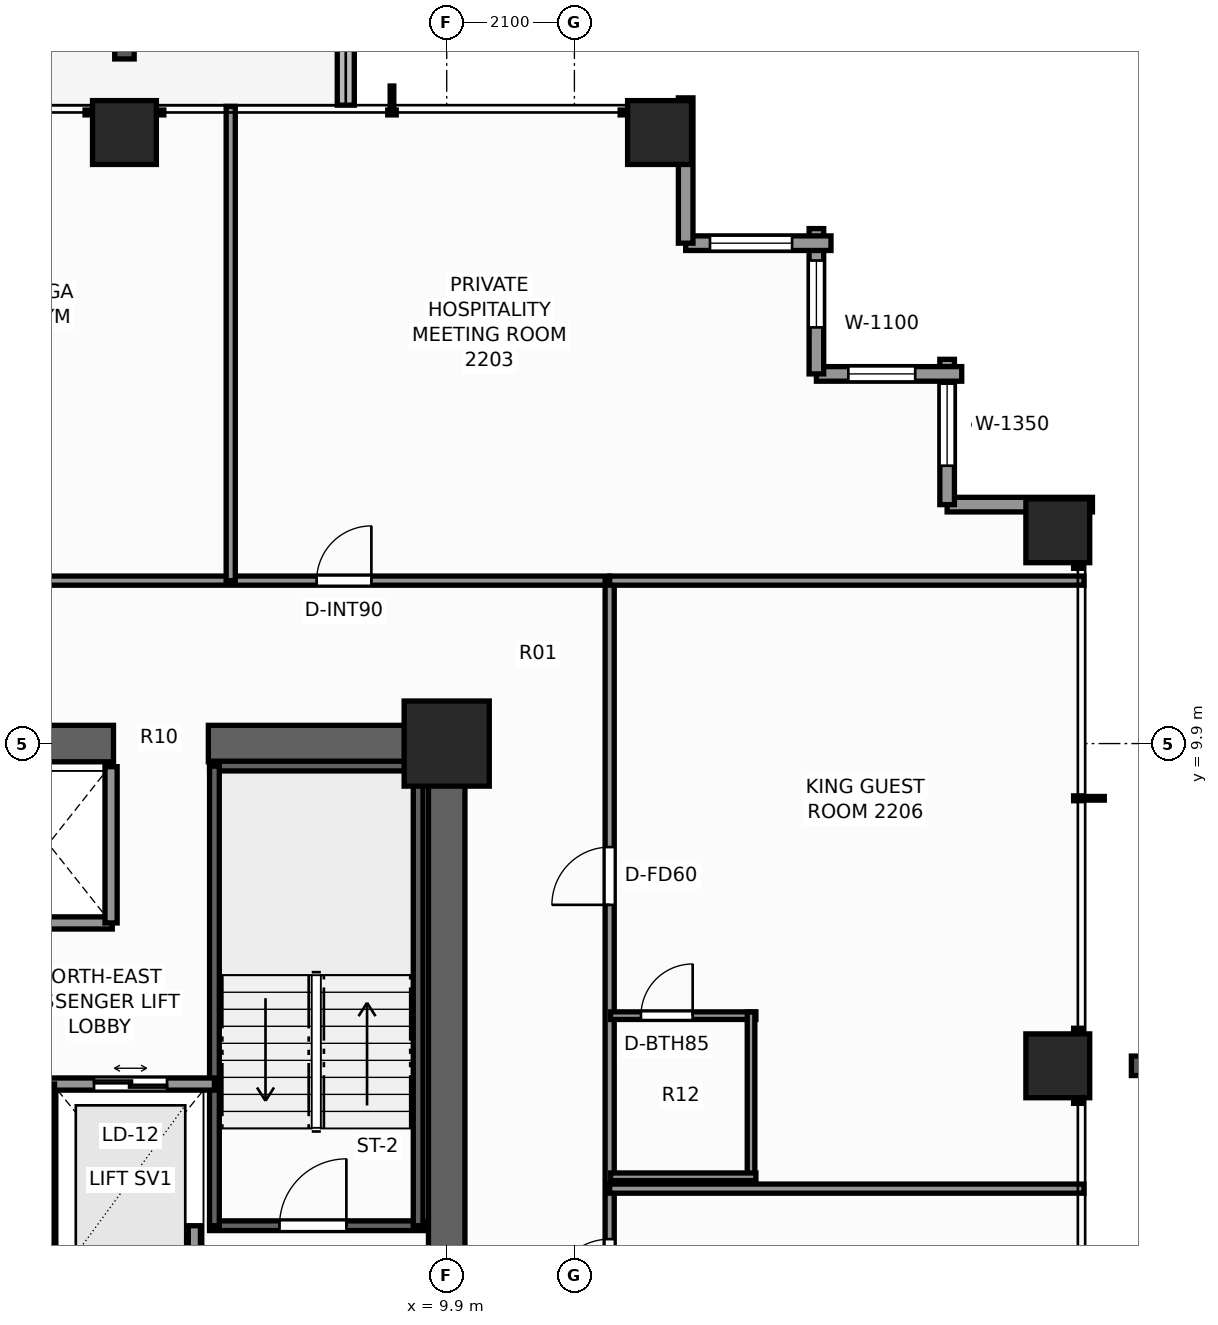
"""IFC4 building model, lengths in metres.
Left out: names, types, materials, properties, quantities, classifications, styles, units other than length and angle.
Written with IfcOpenShell. Run it as: python <this file> out.ifc"""

import sys

from ifc_helpers import new_model, si_unit, direction, frame, frame_2d, origin, origin_2d, place, context, subcontext, project, spatial, rectangle, extrude, element, fill, save


model = new_model("IFC4")
c1 = context("Model", 3, precision=1e-05, world=origin(), true_north=direction((0.0, 1.0)))
c2 = subcontext(c1, "Body", "Model", "MODEL_VIEW")
j1 = project(units=[si_unit("LENGTHUNIT", "METRE"), si_unit("PLANEANGLEUNIT", "RADIAN")], contexts=[c1])
p1 = place(None, origin())
s1 = spatial("IfcSite", under=j1, at=p1, CompositionType="ELEMENT")
p2 = place(p1, origin())
s2 = spatial("IfcBuilding", under=s1, at=p2, CompositionType="ELEMENT")
p3 = place(p2, frame((0.0, 0.0, 78.8)))
s3 = spatial("IfcBuildingStorey", under=s2, at=p3, CompositionType="ELEMENT", Elevation=78.8)
p4 = place(p3, frame((-10.2, 9.9, 0.0), z_axis=(0.0, 0.0, 1.0), x_axis=(1.0, 0.0, 0.0)))
e1 = element("IfcWall", 1, at=p4, inside=s3, PredefinedType="SHEAR", context=c2, shape_type="SweptSolid", body=[
    extrude(rectangle(XDim=14.62, YDim=0.6, at=frame_2d((7.31, 0.0))), origin(), (0.0, 0.0, 1.0), 3.3),
])
p5 = place(p3, frame((5.98, 9.9, 0.0), z_axis=(0.0, 0.0, 1.0), x_axis=(1.0, 0.0, 0.0)))
e2 = element("IfcWall", 2, at=p5, inside=s3, PredefinedType="SHEAR", context=c2, shape_type="SweptSolid", body=[
    extrude(rectangle(XDim=4.22, YDim=0.6, at=frame_2d((2.11, 0.0))), origin(), (0.0, 0.0, 1.0), 3.3),
])
p6 = place(p3, frame((9.9, -3.7, 0.0), z_axis=(0.0, 0.0, 1.0), x_axis=(0.0, 1.0, 0.0)))
e3 = element("IfcWall", 3, at=p6, inside=s3, PredefinedType="SHEAR", context=c2, shape_type="SweptSolid", body=[
    extrude(rectangle(XDim=13.3, YDim=0.6, at=frame_2d((6.65, 0.0))), origin(), (0.0, 0.0, 1.0), 3.3),
])
p7 = place(p6, frame((0.35, 0.0, 0.0)))
e4 = element("IfcOpeningElement", 4, at=p7, cuts=e3, PredefinedType="OPENING", context=c2, shape_type="SweptSolid", body=[
    extrude(rectangle(XDim=1.1, YDim=2.2, at=frame_2d((0.55, 1.1))), frame((0.0, 0.31, 0.0), z_axis=(0.0, -1.0, 0.0), x_axis=(1.0, 0.0, 0.0)), (0.0, 0.0, 1.0), 0.62),
])
p8 = place(p3, frame((9.9, 9.9, 0.0), z_axis=(0.0, 0.0, 1.0), x_axis=(1.0, 0.0, 0.0)))
e5 = element("IfcColumn", 5, at=p8, inside=s3, PredefinedType="COLUMN", context=c2, shape_type="SweptSolid", body=[
    extrude(rectangle(XDim=1.4, YDim=1.4, at=origin_2d()), origin(), (0.0, 0.0, 1.0), 3.3),
])
for number, where, z_axis, x_axis in (
    (6, (4.6, 19.95, 0.0), (0.0, 0.0, 1.0), (1.0, 0.0, 0.0)),
    (7, (13.4, 19.95, 0.0), (0.0, 0.0, 1.0), (1.0, 0.0, 0.0)),
    (8, (19.95, 4.6, 0.0), (0.0, 0.0, 1.0), (1.0, 0.0, 0.0)),
    (9, (19.95, 13.4, 0.0), (0.0, 0.0, 1.0), (1.0, 0.0, 0.0)),
):
    element("IfcColumn", number, at=place(p3, frame(where, z_axis=z_axis, x_axis=x_axis)), inside=s3, PredefinedType="COLUMN", context=c2, shape_type="SweptSolid", body=[
        extrude(rectangle(XDim=1.05, YDim=1.05, at=origin_2d()), origin(), (0.0, 0.0, 1.0), 3.3),
    ])
p9 = place(p3, frame((8.24, 20.4, -0.04), z_axis=(0.0, 0.0, 1.0), x_axis=(0.0, 1.0, 0.0)))
e10 = element("IfcWall", 10, at=p9, inside=s3, PredefinedType="PARAPET", context=c2, shape_type="SweptSolid", body=[
    extrude(rectangle(XDim=3.42, YDim=0.28, at=frame_2d((1.71, 0.0))), origin(), (0.0, 0.0, 1.0), 0.42),
])
p10 = place(p3, frame((18.13, 13.83, 0.0), z_axis=(0.0, 0.0, 1.0), x_axis=(1.0, 0.0, 0.0)))
e11 = element("IfcWall", 11, at=p10, inside=s3, PredefinedType="STANDARD", context=c2, shape_type="SweptSolid", body=[
    extrude(rectangle(XDim=2.39, YDim=0.24, at=frame_2d((1.195, 0.0))), origin(), (0.0, 0.0, 1.0), 2.459),
])
p11 = place(p3, frame((18.13, 16.22, 0.0), z_axis=(0.0, 0.0, 1.0), x_axis=(0.0, -1.0, 0.0)))
e12 = element("IfcWall", 12, at=p11, inside=s3, PredefinedType="STANDARD", context=c2, shape_type="SweptSolid", body=[
    extrude(rectangle(XDim=2.39, YDim=0.24, at=frame_2d((1.195, 0.0))), origin(), (0.0, 0.0, 1.0), 2.459),
])
p12 = place(p11, frame((0.4, 0.0, 0.65)))
e13 = element("IfcOpeningElement", 13, at=p12, cuts=e12, PredefinedType="OPENING", context=c2, shape_type="SweptSolid", body=[
    extrude(rectangle(XDim=1.35, YDim=1.55, at=frame_2d((0.675, 0.775))), frame((0.0, 0.13, 0.0), z_axis=(0.0, -1.0, 0.0), x_axis=(1.0, 0.0, 0.0)), (0.0, 0.0, 1.0), 0.26),
])
p13 = place(p3, frame((15.98, 15.98, 0.0), z_axis=(0.0, 0.0, 1.0), x_axis=(1.0, 0.0, 0.0)))
e14 = element("IfcWall", 14, at=p13, inside=s3, PredefinedType="STANDARD", context=c2, shape_type="SweptSolid", body=[
    extrude(rectangle(XDim=2.39, YDim=0.24, at=frame_2d((1.195, 0.0))), origin(), (0.0, 0.0, 1.0), 2.459),
])
p14 = place(p13, frame((0.525, 0.0, 0.65)))
e15 = element("IfcOpeningElement", 15, at=p14, cuts=e14, PredefinedType="OPENING", context=c2, shape_type="SweptSolid", body=[
    extrude(rectangle(XDim=1.1, YDim=1.45, at=frame_2d((0.55, 0.725))), frame((0.0, 0.13, 0.0), z_axis=(0.0, -1.0, 0.0), x_axis=(1.0, 0.0, 0.0)), (0.0, 0.0, 1.0), 0.26),
])
p15 = place(p3, frame((15.98, 18.37, 0.0), z_axis=(0.0, 0.0, 1.0), x_axis=(0.0, -1.0, 0.0)))
e16 = element("IfcWall", 16, at=p15, inside=s3, PredefinedType="STANDARD", context=c2, shape_type="SweptSolid", body=[
    extrude(rectangle(XDim=2.39, YDim=0.24, at=frame_2d((1.195, 0.0))), origin(), (0.0, 0.0, 1.0), 2.459),
])
p16 = place(p15, frame((0.525, 0.0, 0.65)))
e17 = element("IfcOpeningElement", 17, at=p16, cuts=e16, PredefinedType="OPENING", context=c2, shape_type="SweptSolid", body=[
    extrude(rectangle(XDim=1.1, YDim=1.45, at=frame_2d((0.55, 0.725))), frame((0.0, 0.13, 0.0), z_axis=(0.0, -1.0, 0.0), x_axis=(1.0, 0.0, 0.0)), (0.0, 0.0, 1.0), 0.26),
])
p17 = place(p3, frame((13.83, 18.13, 0.0), z_axis=(0.0, 0.0, 1.0), x_axis=(1.0, 0.0, 0.0)))
e18 = element("IfcWall", 18, at=p17, inside=s3, PredefinedType="STANDARD", context=c2, shape_type="SweptSolid", body=[
    extrude(rectangle(XDim=2.39, YDim=0.24, at=frame_2d((1.195, 0.0))), origin(), (0.0, 0.0, 1.0), 2.459),
])
p18 = place(p17, frame((0.4, 0.0, 0.65)))
e19 = element("IfcOpeningElement", 19, at=p18, cuts=e18, PredefinedType="OPENING", context=c2, shape_type="SweptSolid", body=[
    extrude(rectangle(XDim=1.35, YDim=1.55, at=frame_2d((0.675, 0.775))), frame((0.0, 0.13, 0.0), z_axis=(0.0, -1.0, 0.0), x_axis=(1.0, 0.0, 0.0)), (0.0, 0.0, 1.0), 0.26),
])
p19 = place(p3, frame((13.83, 20.52, 0.0), z_axis=(0.0, 0.0, 1.0), x_axis=(0.0, -1.0, 0.0)))
e20 = element("IfcWall", 20, at=p19, inside=s3, PredefinedType="STANDARD", context=c2, shape_type="SweptSolid", body=[
    extrude(rectangle(XDim=2.39, YDim=0.24, at=frame_2d((1.195, 0.0))), origin(), (0.0, 0.0, 1.0), 2.459),
])
p20 = place(p3, frame((6.0, 1.97, 0.0), z_axis=(0.0, 0.0, 1.0), x_axis=(1.0, 0.0, 0.0)))
e21 = element("IfcWall", 21, at=p20, inside=s3, PredefinedType="SHEAR", context=c2, shape_type="SweptSolid", body=[
    extrude(rectangle(XDim=3.52, YDim=0.16, at=frame_2d((1.76, 0.0))), origin(), (0.0, 0.0, 1.0), 3.3),
])
p21 = place(p20, frame((1.15, 0.0, 0.0)))
e22 = element("IfcOpeningElement", 22, at=p21, cuts=e21, PredefinedType="OPENING", context=c2, shape_type="SweptSolid", body=[
    extrude(rectangle(XDim=1.1, YDim=2.2, at=frame_2d((0.55, 1.1))), frame((0.0, 0.09, 0.0), z_axis=(0.0, -1.0, 0.0), x_axis=(1.0, 0.0, 0.0)), (0.0, 0.0, 1.0), 0.18),
])
p22 = place(p3, frame((6.0, 9.53, 0.0), z_axis=(0.0, 0.0, 1.0), x_axis=(1.0, 0.0, 0.0)))
e23 = element("IfcWall", 23, at=p22, inside=s3, PredefinedType="SHEAR", context=c2, shape_type="SweptSolid", body=[
    extrude(rectangle(XDim=3.52, YDim=0.16, at=frame_2d((1.76, 0.0))), origin(), (0.0, 0.0, 1.0), 3.3),
])
for number, where, z_axis, x_axis in (
    (24, (6.08, 1.97, 0.0), (0.0, 0.0, 1.0), (0.0, 1.0, 0.0)),
    (25, (9.43, 1.97, 0.0), (0.0, 0.0, 1.0), (0.0, 1.0, 0.0)),
):
    element("IfcWall", number, at=place(p3, frame(where, z_axis=z_axis, x_axis=x_axis)), inside=s3, PredefinedType="SHEAR", context=c2, shape_type="SweptSolid", body=[
        extrude(rectangle(XDim=7.56, YDim=0.16, at=frame_2d((3.78, 0.0))), origin(), (0.0, 0.0, 1.0), 3.3),
    ])
p23 = place(p3, frame((5.75, -3.6, 0.0), z_axis=(0.0, 0.0, 1.0), x_axis=(0.0, 1.0, 0.0)))
e26 = element("IfcWall", 26, at=p23, inside=s3, PredefinedType="SOLIDWALL", context=c2, shape_type="SweptSolid", body=[
    extrude(rectangle(XDim=5.57, YDim=0.2, at=frame_2d((2.785, 0.0))), origin(), (0.0, 0.0, 1.0), 3.08),
])
p24 = place(p23, frame((2.75, 0.0, 0.0)))
e27 = element("IfcOpeningElement", 27, at=p24, cuts=e26, PredefinedType="OPENING", context=c2, shape_type="SweptSolid", body=[
    extrude(rectangle(XDim=1.1, YDim=2.2, at=frame_2d((0.55, 1.1))), frame((0.0, 0.11, 0.0), z_axis=(0.0, -1.0, 0.0), x_axis=(1.0, 0.0, 0.0)), (0.0, 0.0, 1.0), 0.22),
])
p25 = place(p3, frame((3.35, 4.3, 0.0), z_axis=(0.0, 0.0, 1.0), x_axis=(1.0, 0.0, 0.0)))
e28 = element("IfcWall", 28, at=p25, inside=s3, PredefinedType="SOLIDWALL", context=c2, shape_type="SweptSolid", body=[
    extrude(rectangle(XDim=2.73, YDim=0.2, at=frame_2d((1.365, 0.0))), origin(), (0.0, 0.0, 1.0), 3.08),
])
p26 = place(p25, frame((0.75, 0.0, 0.0)))
e29 = element("IfcOpeningElement", 29, at=p26, cuts=e28, PredefinedType="OPENING", context=c2, shape_type="SweptSolid", body=[
    extrude(rectangle(XDim=1.2, YDim=2.25, at=frame_2d((0.6, 1.125))), frame((0.0, 0.11, 0.0), z_axis=(0.0, -1.0, 0.0), x_axis=(1.0, 0.0, 0.0)), (0.0, 0.0, 1.0), 0.22),
])
p27 = place(p3, frame((0.22, 6.95, 0.0), z_axis=(0.0, 0.0, 1.0), x_axis=(1.0, 0.0, 0.0)))
e30 = element("IfcWall", 30, at=p27, inside=s3, PredefinedType="SOLIDWALL", context=c2, shape_type="SweptSolid", body=[
    extrude(rectangle(XDim=4.18, YDim=0.2, at=frame_2d((2.09, 0.0))), origin(), (0.0, 0.0, 1.0), 3.08),
])
p28 = place(p3, frame((4.38, 6.95, 0.0), z_axis=(0.0, 0.0, 1.0), x_axis=(0.0, 1.0, 0.0)))
e31 = element("IfcWall", 31, at=p28, inside=s3, PredefinedType="SOLIDWALL", context=c2, shape_type="SweptSolid", body=[
    extrude(rectangle(XDim=2.57, YDim=0.2, at=frame_2d((1.285, 0.0))), origin(), (0.0, 0.0, 1.0), 3.08),
])
p29 = place(p3, frame((3.35, 1.1, 0.0), z_axis=(0.0, 0.0, 1.0), x_axis=(0.0, 1.0, 0.0)))
e32 = element("IfcWall", 32, at=p29, inside=s3, PredefinedType="SOLIDWALL", context=c2, shape_type="SweptSolid", body=[
    extrude(rectangle(XDim=3.2, YDim=0.2, at=frame_2d((1.6, 0.0))), origin(), (0.0, 0.0, 1.0), 3.08),
])
p30 = place(p3, frame((-12.58, 12.58, 0.0), z_axis=(0.0, 0.0, 1.0), x_axis=(1.0, 0.0, 0.0)))
e33 = element("IfcWall", 33, at=p30, inside=s3, PredefinedType="PARTITIONING", context=c2, shape_type="SweptSolid", body=[
    extrude(rectangle(XDim=25.16, YDim=0.15, at=frame_2d((12.58, 0.0))), origin(), (0.0, 0.0, 1.0), 2.292),
])
p31 = place(p30, frame((3.657, 0.0, 0.0)))
e34 = element("IfcOpeningElement", 34, at=p31, cuts=e33, PredefinedType="OPENING", context=c2, shape_type="SweptSolid", body=[
    extrude(rectangle(XDim=0.9, YDim=2.06, at=frame_2d((0.45, 1.03))), frame((0.0, 0.085, 0.0), z_axis=(0.0, -1.0, 0.0), x_axis=(1.0, 0.0, 0.0)), (0.0, 0.0, 1.0), 0.17),
])
p32 = place(p30, frame((6.082, 0.0, 0.0)))
e35 = element("IfcOpeningElement", 35, at=p32, cuts=e33, PredefinedType="OPENING", context=c2, shape_type="SweptSolid", body=[
    extrude(rectangle(XDim=0.9, YDim=2.06, at=frame_2d((0.45, 1.03))), frame((0.0, 0.085, 0.0), z_axis=(0.0, -1.0, 0.0), x_axis=(1.0, 0.0, 0.0)), (0.0, 0.0, 1.0), 0.17),
])
p33 = place(p30, frame((8.836, 0.0, 0.0)))
e36 = element("IfcOpeningElement", 36, at=p33, cuts=e33, PredefinedType="OPENING", context=c2, shape_type="SweptSolid", body=[
    extrude(rectangle(XDim=0.95, YDim=2.06, at=frame_2d((0.475, 1.03))), frame((0.0, 0.085, 0.0), z_axis=(0.0, -1.0, 0.0), x_axis=(1.0, 0.0, 0.0)), (0.0, 0.0, 1.0), 0.17),
])
p34 = place(p30, frame((14.16, 0.0, 0.0)))
e37 = element("IfcOpeningElement", 37, at=p34, cuts=e33, PredefinedType="OPENING", context=c2, shape_type="SweptSolid", body=[
    extrude(rectangle(XDim=0.9, YDim=2.06, at=frame_2d((0.45, 1.03))), frame((0.0, 0.085, 0.0), z_axis=(0.0, -1.0, 0.0), x_axis=(1.0, 0.0, 0.0)), (0.0, 0.0, 1.0), 0.17),
])
p35 = place(p30, frame((20.341, 0.0, 0.0)))
e38 = element("IfcOpeningElement", 38, at=p35, cuts=e33, PredefinedType="OPENING", context=c2, shape_type="SweptSolid", body=[
    extrude(rectangle(XDim=0.9, YDim=2.06, at=frame_2d((0.45, 1.03))), frame((0.0, 0.085, 0.0), z_axis=(0.0, -1.0, 0.0), x_axis=(1.0, 0.0, 0.0)), (0.0, 0.0, 1.0), 0.17),
])
p36 = place(p3, frame((12.58, -12.26, 0.0), z_axis=(0.0, 0.0, 1.0), x_axis=(0.0, 1.0, 0.0)))
e39 = element("IfcWall", 39, at=p36, inside=s3, PredefinedType="PARTITIONING", context=c2, shape_type="SweptSolid", body=[
    extrude(rectangle(XDim=24.84, YDim=0.15, at=frame_2d((12.42, 0.0))), origin(), (0.0, 0.0, 1.0), 2.292),
])
p37 = place(p36, frame((4.275, 0.0, 0.0)))
e40 = element("IfcOpeningElement", 40, at=p37, cuts=e39, PredefinedType="OPENING", context=c2, shape_type="SweptSolid", body=[
    extrude(rectangle(XDim=0.9, YDim=2.06, at=frame_2d((0.45, 1.03))), frame((0.0, 0.085, 0.0), z_axis=(0.0, -1.0, 0.0), x_axis=(1.0, 0.0, 0.0)), (0.0, 0.0, 1.0), 0.17),
])
p38 = place(p36, frame((13.059, 0.0, 0.0)))
e41 = element("IfcOpeningElement", 41, at=p38, cuts=e39, PredefinedType="OPENING", context=c2, shape_type="SweptSolid", body=[
    extrude(rectangle(XDim=0.95, YDim=2.06, at=frame_2d((0.475, 1.03))), frame((0.0, 0.085, 0.0), z_axis=(0.0, -1.0, 0.0), x_axis=(1.0, 0.0, 0.0)), (0.0, 0.0, 1.0), 0.17),
])
p39 = place(p36, frame((19.508, 0.0, 0.0)))
e42 = element("IfcOpeningElement", 42, at=p39, cuts=e39, PredefinedType="OPENING", context=c2, shape_type="SweptSolid", body=[
    extrude(rectangle(XDim=0.95, YDim=2.06, at=frame_2d((0.475, 1.03))), frame((0.0, 0.085, 0.0), z_axis=(0.0, -1.0, 0.0), x_axis=(1.0, 0.0, 0.0)), (0.0, 0.0, 1.0), 0.17),
])
p40 = place(p3, frame((12.58, 12.58, 0.0), z_axis=(0.0, 0.0, 1.0), x_axis=(1.0, 0.0, 0.0)))
e43 = element("IfcWall", 43, at=p40, inside=s3, PredefinedType="PARTITIONING", context=c2, shape_type="SweptSolid", body=[
    extrude(rectangle(XDim=7.8, YDim=0.15, at=frame_2d((3.9, 0.0))), origin(), (0.0, 0.0, 1.0), 2.292),
])
for number, where, z_axis, x_axis in (
    (44, (6.348, 12.58, 0.0), (0.0, 0.0, 1.0), (0.0, 1.0, 0.0)),
    (45, (12.58, 2.58, 0.0), (0.0, 0.0, 1.0), (1.0, 0.0, 0.0)),
):
    element("IfcWall", number, at=place(p3, frame(where, z_axis=z_axis, x_axis=x_axis)), inside=s3, PredefinedType="PARTITIONING", context=c2, shape_type="SweptSolid", body=[
        extrude(rectangle(XDim=7.8, YDim=0.15, at=frame_2d((3.9, 0.0))), origin(), (0.0, 0.0, 1.0), 2.449),
    ])
p41 = place(p3, frame((12.595, 5.425, 0.0), z_axis=(0.0, 0.0, 1.0), x_axis=(1.0, 0.0, 0.0)))
e46 = element("IfcWall", 46, at=p41, inside=s3, PredefinedType="PARTITIONING", context=c2, shape_type="SweptSolid", body=[
    extrude(rectangle(XDim=2.39, YDim=0.125, at=frame_2d((1.195, 0.0))), origin(), (0.0, 0.0, 1.0), 3.08),
])
p42 = place(p41, frame((0.5, 0.0, 0.0)))
e47 = element("IfcOpeningElement", 47, at=p42, cuts=e46, PredefinedType="OPENING", context=c2, shape_type="SweptSolid", body=[
    extrude(rectangle(XDim=0.85, YDim=2.03, at=frame_2d((0.425, 1.015))), frame((0.0, 0.073, 0.0), z_axis=(0.0, -1.0, 0.0), x_axis=(1.0, 0.0, 0.0)), (0.0, 0.0, 1.0), 0.145),
])
p43 = place(p3, frame((14.905, 2.715, 0.0), z_axis=(0.0, 0.0, 1.0), x_axis=(0.0, 1.0, 0.0)))
e48 = element("IfcWall", 48, at=p43, inside=s3, PredefinedType="PARTITIONING", context=c2, shape_type="SweptSolid", body=[
    extrude(rectangle(XDim=2.77, YDim=0.125, at=frame_2d((1.385, 0.0))), origin(), (0.0, 0.0, 1.0), 2.292),
])
p44 = place(p3, frame((12.595, 2.775, 0.0), z_axis=(0.0, 0.0, 1.0), x_axis=(1.0, 0.0, 0.0)))
e49 = element("IfcWall", 49, at=p44, inside=s3, PredefinedType="PARTITIONING", context=c2, shape_type="SweptSolid", body=[
    extrude(rectangle(XDim=2.39, YDim=0.125, at=frame_2d((1.195, 0.0))), origin(), (0.0, 0.0, 1.0), 3.08),
])
p45 = place(p12, origin())
e50 = element("IfcWindow", 50, at=p45, inside=s3, PartitioningType="SINGLE_PANEL", PredefinedType="WINDOW", context=c2, shape_type="SweptSolid", body=[
    extrude(rectangle(XDim=1.35, YDim=1.55, at=frame_2d((0.675, 0.775))), frame((0.0, 0.03, 0.0), z_axis=(0.0, -1.0, 0.0), x_axis=(1.0, 0.0, 0.0)), (0.0, 0.0, 1.0), 0.06),
])
fill(e13, e50)
p46 = place(p14, origin())
e51 = element("IfcWindow", 51, at=p46, inside=s3, PartitioningType="SINGLE_PANEL", PredefinedType="WINDOW", context=c2, shape_type="SweptSolid", body=[
    extrude(rectangle(XDim=1.1, YDim=1.45, at=frame_2d((0.55, 0.725))), frame((0.0, 0.03, 0.0), z_axis=(0.0, -1.0, 0.0), x_axis=(1.0, 0.0, 0.0)), (0.0, 0.0, 1.0), 0.06),
])
fill(e15, e51)
p47 = place(p16, origin())
e52 = element("IfcWindow", 52, at=p47, inside=s3, PartitioningType="SINGLE_PANEL", PredefinedType="WINDOW", context=c2, shape_type="SweptSolid", body=[
    extrude(rectangle(XDim=1.1, YDim=1.45, at=frame_2d((0.55, 0.725))), frame((0.0, 0.03, 0.0), z_axis=(0.0, -1.0, 0.0), x_axis=(1.0, 0.0, 0.0)), (0.0, 0.0, 1.0), 0.06),
])
fill(e17, e52)
p48 = place(p18, origin())
e53 = element("IfcWindow", 53, at=p48, inside=s3, PartitioningType="SINGLE_PANEL", PredefinedType="WINDOW", context=c2, shape_type="SweptSolid", body=[
    extrude(rectangle(XDim=1.35, YDim=1.55, at=frame_2d((0.675, 0.775))), frame((0.0, 0.03, 0.0), z_axis=(0.0, -1.0, 0.0), x_axis=(1.0, 0.0, 0.0)), (0.0, 0.0, 1.0), 0.06),
])
fill(e19, e53)
p49 = place(p21, origin())
e54 = element("IfcDoor", 54, at=p49, inside=s3, OperationType="SINGLE_SWING_RIGHT", PredefinedType="DOOR", context=c2, shape_type="SweptSolid", body=[
    extrude(rectangle(XDim=1.1, YDim=2.2, at=frame_2d((0.55, 1.1))), frame((0.0, 0.025, 0.0), z_axis=(0.0, -1.0, 0.0), x_axis=(1.0, 0.0, 0.0)), (0.0, 0.0, 1.0), 0.05),
])
fill(e22, e54)
p50 = place(p26, origin())
e55 = element("IfcDoor", 55, at=p50, inside=s3, OperationType="DOUBLE_DOOR_SLIDING", PredefinedType="DOOR", context=c2, shape_type="SweptSolid", body=[
    extrude(rectangle(XDim=1.2, YDim=2.25, at=frame_2d((0.6, 1.125))), frame((0.0, 0.025, 0.0), z_axis=(0.0, -1.0, 0.0), x_axis=(1.0, 0.0, 0.0)), (0.0, 0.0, 1.0), 0.05),
])
fill(e29, e55)
p51 = place(p35, origin())
e56 = element("IfcDoor", 56, at=p51, inside=s3, OperationType="SINGLE_SWING_RIGHT", PredefinedType="DOOR", context=c2, shape_type="SweptSolid", body=[
    extrude(rectangle(XDim=0.9, YDim=2.06, at=frame_2d((0.45, 1.03))), frame((0.0, 0.025, 0.0), z_axis=(0.0, -1.0, 0.0), x_axis=(1.0, 0.0, 0.0)), (0.0, 0.0, 1.0), 0.05),
])
fill(e38, e56)
p52 = place(p38, origin())
e57 = element("IfcDoor", 57, at=p52, inside=s3, OperationType="SINGLE_SWING_LEFT", PredefinedType="DOOR", context=c2, shape_type="SweptSolid", body=[
    extrude(rectangle(XDim=0.95, YDim=2.06, at=frame_2d((0.475, 1.03))), frame((0.0, 0.025, 0.0), z_axis=(0.0, -1.0, 0.0), x_axis=(1.0, 0.0, 0.0)), (0.0, 0.0, 1.0), 0.05),
])
fill(e41, e57)
p53 = place(p42, origin())
e58 = element("IfcDoor", 58, at=p53, inside=s3, OperationType="SINGLE_SWING_RIGHT", PredefinedType="DOOR", context=c2, shape_type="SweptSolid", body=[
    extrude(rectangle(XDim=0.85, YDim=2.03, at=frame_2d((0.425, 1.015))), frame((0.0, 0.025, 0.0), z_axis=(0.0, -1.0, 0.0), x_axis=(1.0, 0.0, 0.0)), (0.0, 0.0, 1.0), 0.05),
])
fill(e47, e58)
p54 = place(p39, origin())
e59 = element("IfcDoor", 59, at=p54, inside=s3, OperationType="SINGLE_SWING_LEFT", PredefinedType="DOOR", context=c2, shape_type="SweptSolid", body=[
    extrude(rectangle(XDim=0.95, YDim=2.06, at=frame_2d((0.475, 1.03))), frame((0.0, 0.025, 0.0), z_axis=(0.0, -1.0, 0.0), x_axis=(1.0, 0.0, 0.0)), (0.0, 0.0, 1.0), 0.05),
])
fill(e42, e59)
save(model, sys.argv[1])
